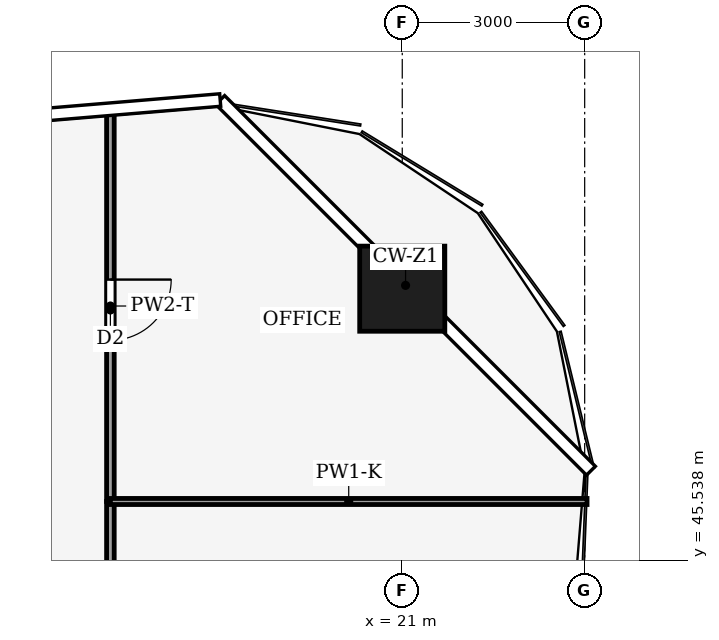
"""IFC4 building model, lengths in metres.
Left out: names, types, materials, properties, quantities, classifications, styles, units other than length and angle.
Written with IfcOpenShell. Run it as: python <this file> out.ifc"""

import sys

from ifc_helpers import new_model, si_unit, direction, frame, frame_2d, origin, origin_2d, place, context, subcontext, project, spatial, rectangle, hollow_rectangle, extrude, element, fill, save


model = new_model("IFC4")
c1 = context("Model", 3, precision=1e-05, world=origin(), true_north=direction((0.0, 1.0)))
c2 = subcontext(c1, "Body", "Model", "MODEL_VIEW")
j1 = project(units=[si_unit("LENGTHUNIT", "METRE"), si_unit("PLANEANGLEUNIT", "RADIAN")], contexts=[c1])
p1 = place(None, origin())
s1 = spatial("IfcSite", under=j1, at=p1, CompositionType="ELEMENT")
p2 = place(p1, origin())
s2 = spatial("IfcBuilding", under=s1, at=p2, CompositionType="ELEMENT")
p3 = place(p2, frame((0.0, 0.0, 110.0)))
s3 = spatial("IfcBuildingStorey", under=s2, at=p3, CompositionType="ELEMENT", Elevation=110.0)
p4 = place(p3, frame((21.0, 50.0, 0.0), z_axis=(0.0, 0.0, 1.0), x_axis=(1.0, 0.0, 0.0)))
e1 = element("IfcColumn", 1, at=p4, inside=s3, PredefinedType="COLUMN", context=c2, shape_type="SweptSolid", body=[
    extrude(hollow_rectangle(XDim=1.4, YDim=1.4, WallThickness=0.08, at=origin_2d()), origin(), (0.0, 0.0, 1.0), 4.0),
])
p5 = place(p3, frame((16.2, 46.5, 0.0), z_axis=(0.0, 0.0, 1.0), x_axis=(0.0, -1.0, 0.0)))
e2 = element("IfcWall", 2, at=p5, inside=s3, PredefinedType="PARTITIONING", context=c2, shape_type="SweptSolid", body=[
    extrude(rectangle(XDim=6.0, YDim=0.125, at=frame_2d((3.0, 0.0))), origin(), (0.0, 0.0, 1.0), 3.75),
])
p6 = place(p5, frame((2.5, 0.0, 0.0)))
e3 = element("IfcOpeningElement", 3, at=p6, cuts=e2, PredefinedType="OPENING", context=c2, shape_type="SweptSolid", body=[
    extrude(rectangle(XDim=1.0, YDim=2.1, at=frame_2d((0.5, 1.05))), frame((0.0, 0.073, 0.0), z_axis=(0.0, -1.0, 0.0), x_axis=(1.0, 0.0, 0.0)), (0.0, 0.0, 1.0), 0.145),
])
p7 = place(p3, frame((16.2, 52.93, 0.0), z_axis=(0.0, 0.0, 1.0), x_axis=(0.0, -1.0, 0.0)))
e4 = element("IfcWall", 4, at=p7, inside=s3, PredefinedType="PARTITIONING", context=c2, shape_type="SweptSolid", body=[
    extrude(rectangle(XDim=6.43, YDim=0.125, at=frame_2d((3.215, 0.0))), origin(), (0.0, 0.0, 1.0), 2.92),
])
p8 = place(p7, frame((2.78, 0.0, 0.0)))
e5 = element("IfcOpeningElement", 5, at=p8, cuts=e4, PredefinedType="OPENING", context=c2, shape_type="SweptSolid", body=[
    extrude(rectangle(XDim=1.0, YDim=2.1, at=frame_2d((0.5, 1.05))), frame((0.0, 0.073, 0.0), z_axis=(0.0, -1.0, 0.0), x_axis=(1.0, 0.0, 0.0)), (0.0, 0.0, 1.0), 0.145),
])
p9 = place(p3, frame((24.039, 46.5, 0.0), z_axis=(0.0, 0.0, 1.0), x_axis=(-1.0, 0.0, 0.0)))
e6 = element("IfcWall", 6, at=p9, inside=s3, PredefinedType="PARTITIONING", context=c2, shape_type="SweptSolid", body=[
    extrude(rectangle(XDim=7.839, YDim=0.1, at=frame_2d((3.919, 0.0))), origin(), (0.0, 0.0, 1.0), 2.92),
])
p10 = place(p8, origin())
e7 = element("IfcDoor", 7, at=p10, inside=s3, OperationType="SINGLE_SWING_RIGHT", PredefinedType="DOOR", context=c2, shape_type="SweptSolid", body=[
    extrude(rectangle(XDim=1.0, YDim=2.1, at=frame_2d((0.5, 1.05))), frame((0.0, 0.025, 0.0), z_axis=(0.0, -1.0, 0.0), x_axis=(1.0, 0.0, 0.0)), (0.0, 0.0, 1.0), 0.05),
])
fill(e5, e7)
save(model, sys.argv[1])
